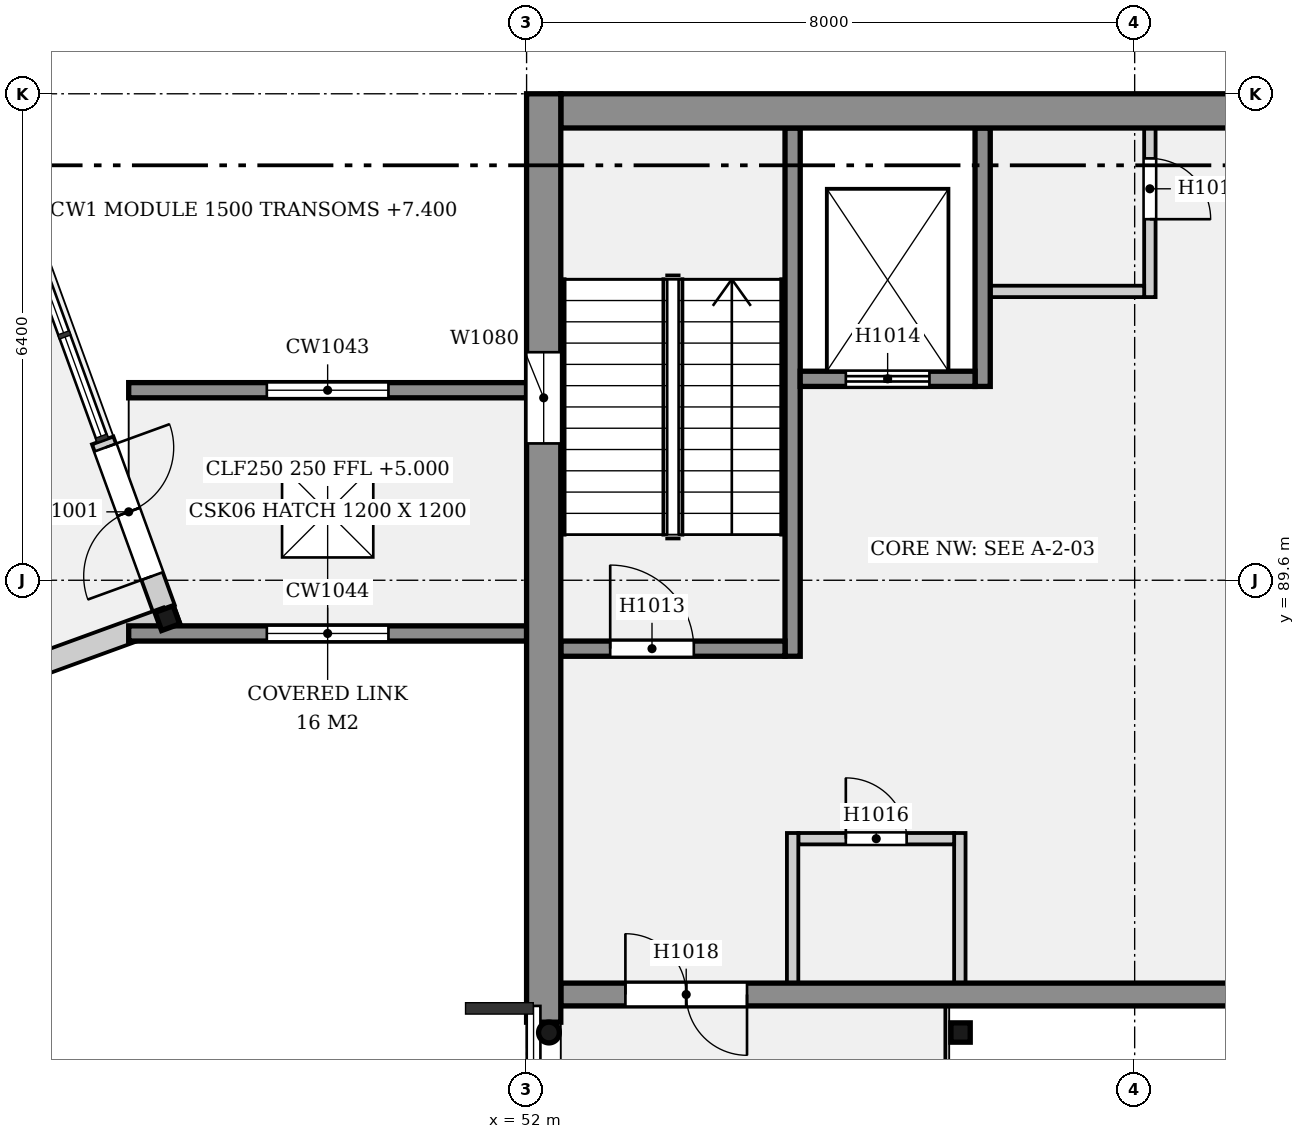
"""IFC4 building model, lengths in metres.
Left out: names, types, materials, properties, quantities, classifications, styles, units other than length and angle.
Written with IfcOpenShell. Run it as: python <this file> out.ifc"""

import sys

from ifc_helpers import new_model, si_unit, direction, frame, frame_2d, origin, origin_2d, place, context, subcontext, project, spatial, rectangle, hollow_rectangle, hollow_circle, extrude, element, fill, save


model = new_model("IFC4")
c1 = context("Model", 3, precision=1e-05, world=origin(), true_north=direction((0.0, 1.0)))
c2 = subcontext(c1, "Body", "Model", "MODEL_VIEW")
j1 = project(units=[si_unit("LENGTHUNIT", "METRE"), si_unit("PLANEANGLEUNIT", "RADIAN")], contexts=[c1])
p1 = place(None, origin())
s1 = spatial("IfcSite", under=j1, at=p1, CompositionType="ELEMENT")
p2 = place(p1, origin())
s2 = spatial("IfcBuilding", under=s1, at=p2, CompositionType="ELEMENT")
p3 = place(p2, frame((0.0, 0.0, 5.0)))
s3 = spatial("IfcBuildingStorey", under=s2, at=p3, CompositionType="ELEMENT", Elevation=5.0)
p4 = place(p3, frame((52.225, 96.0, 0.0), z_axis=(0.0, 0.0, 1.0), x_axis=(0.0, -1.0, 0.0)))
e1 = element("IfcWall", 1, at=p4, inside=s3, PredefinedType="ELEMENTEDWALL", context=c2, shape_type="SweptSolid", body=[
    extrude(rectangle(XDim=12.214, YDim=0.45, at=frame_2d((6.107, 0.0))), origin(), (0.0, 0.0, 1.0), 4.4),
])
p5 = place(p4, frame((3.4, 0.0, 0.6)))
e2 = element("IfcOpeningElement", 2, at=p5, cuts=e1, PredefinedType="OPENING", context=c2, shape_type="SweptSolid", body=[
    extrude(rectangle(XDim=1.2, YDim=3.0, at=frame_2d((0.6, 1.5))), frame((0.0, 0.235, 0.0), z_axis=(0.0, -1.0, 0.0), x_axis=(1.0, 0.0, 0.0)), (0.0, 0.0, 1.0), 0.47),
])
p6 = place(p3, frame((52.45, 95.775, 0.0), z_axis=(0.0, 0.0, 1.0), x_axis=(1.0, 0.0, 0.0)))
e3 = element("IfcWall", 3, at=p6, inside=s3, PredefinedType="ELEMENTEDWALL", context=c2, shape_type="SweptSolid", body=[
    extrude(rectangle(XDim=11.764, YDim=0.45, at=frame_2d((5.882, 0.0))), origin(), (0.0, 0.0, 1.0), 4.4),
])
p7 = place(p3, frame((52.45, 84.15, 0.0), z_axis=(0.0, 0.0, 1.0), x_axis=(1.0, 0.0, 0.0)))
e4 = element("IfcWall", 4, at=p7, inside=s3, PredefinedType="SOLIDWALL", context=c2, shape_type="SweptSolid", body=[
    extrude(rectangle(XDim=11.55, YDim=0.3, at=frame_2d((5.775, 0.0))), origin(), (0.0, 0.0, 1.0), 4.4),
])
p8 = place(p7, frame((0.85, 0.0, 0.0)))
e5 = element("IfcOpeningElement", 5, at=p8, cuts=e4, PredefinedType="OPENING", context=c2, shape_type="SweptSolid", body=[
    extrude(rectangle(XDim=1.6, YDim=2.1, at=frame_2d((0.8, 1.05))), frame((0.0, 0.16, 0.0), z_axis=(0.0, -1.0, 0.0), x_axis=(1.0, 0.0, 0.0)), (0.0, 0.0, 1.0), 0.32),
])
p9 = place(p3, frame((52.294, 83.65, 0.027), z_axis=(-0.19937683017, 0.0, 0.979922894717), x_axis=(0.0, -1.0, 0.0)))
e6 = element("IfcColumn", 6, at=p9, inside=s3, PredefinedType="COLUMN", context=c2, shape_type="SweptSolid", body=[
    extrude(hollow_circle(Radius=0.136, WallThickness=0.013, at=origin_2d()), origin(), (0.0, 0.0, 1.0), 4.462),
])
p10 = place(p3, frame((57.71, 83.65, 0.0), z_axis=(0.0, 0.0, 1.0), x_axis=(1.0, 0.0, 0.0)))
e7 = element("IfcColumn", 7, at=p10, inside=s3, PredefinedType="COLUMN", context=c2, shape_type="SweptSolid", body=[
    extrude(hollow_rectangle(XDim=0.254, YDim=0.254, WallThickness=0.016, InnerFilletRadius=0.008, OuterFilletRadius=0.024, at=origin_2d()), origin(), (0.0, 0.0, 1.0), 4.4),
])
p11 = place(p3, frame((47.274, 89.102, 0.0), z_axis=(0.0, 0.0, 1.0), x_axis=(0.939692620786, 0.342020143326, 0.0)))
e8 = element("IfcColumn", 8, at=p11, inside=s3, PredefinedType="COLUMN", context=c2, shape_type="SweptSolid", body=[
    extrude(hollow_rectangle(XDim=0.254, YDim=0.254, WallThickness=0.012, at=origin_2d()), origin(), (0.0, 0.0, 1.0), 4.4),
])
p12 = place(p3, frame((43.516, 87.733, 0.0), z_axis=(0.0, 0.0, 1.0), x_axis=(0.939686455819, 0.342037080957, 0.0)))
e9 = element("IfcWall", 9, at=p12, inside=s3, PredefinedType="ELEMENTEDWALL", context=c2, shape_type="SweptSolid", body=[
    extrude(rectangle(XDim=4.0, YDim=0.3, at=frame_2d((2.0, 0.0))), origin(), (0.0, 0.0, 1.0), 4.4),
])
p13 = place(p3, frame((47.231, 89.221, 0.0), z_axis=(0.0, 0.0, 1.0), x_axis=(-0.342008689597, 0.939696789523, 0.0)))
e10 = element("IfcWall", 10, at=p13, inside=s3, PredefinedType="ELEMENTEDWALL", context=c2, shape_type="SweptSolid", body=[
    extrude(rectangle(XDim=2.361, YDim=0.3, at=frame_2d((1.181, 0.0))), origin(), (0.0, 0.0, 1.0), 3.703),
])
p14 = place(p13, frame((0.461, 0.0, 0.0)))
e11 = element("IfcOpeningElement", 11, at=p14, cuts=e10, PredefinedType="OPENING", context=c2, shape_type="SweptSolid", body=[
    extrude(rectangle(XDim=1.8, YDim=2.1, at=frame_2d((0.9, 1.05))), frame((0.0, 0.16, 0.0), z_axis=(0.0, -1.0, 0.0), x_axis=(1.0, 0.0, 0.0)), (0.0, 0.0, 1.0), 0.32),
])
p15 = place(p3, frame((46.765, 92.1, 0.0), z_axis=(0.0, 0.0, 1.0), x_axis=(1.0, 0.0, 0.0)))
e12 = element("IfcWall", 12, at=p15, inside=s3, PredefinedType="ELEMENTEDWALL", context=c2, shape_type="SweptSolid", body=[
    extrude(rectangle(XDim=5.235, YDim=0.2, at=frame_2d((2.617, 0.0))), origin(), (0.0, 0.0, 1.0), 3.2),
])
p16 = place(p15, frame((1.817, 0.0, 0.9)))
e13 = element("IfcOpeningElement", 13, at=p16, cuts=e12, PredefinedType="OPENING", context=c2, shape_type="SweptSolid", body=[
    extrude(rectangle(XDim=1.6, YDim=1.6, at=frame_2d((0.8, 0.8))), frame((0.0, 0.11, 0.0), z_axis=(0.0, -1.0, 0.0), x_axis=(1.0, 0.0, 0.0)), (0.0, 0.0, 1.0), 0.22),
])
p17 = place(p3, frame((46.765, 88.9, 0.0), z_axis=(0.0, 0.0, 1.0), x_axis=(1.0, 0.0, 0.0)))
e14 = element("IfcWall", 14, at=p17, inside=s3, PredefinedType="ELEMENTEDWALL", context=c2, shape_type="SweptSolid", body=[
    extrude(rectangle(XDim=5.235, YDim=0.2, at=frame_2d((2.617, 0.0))), origin(), (0.0, 0.0, 1.0), 3.2),
])
p18 = place(p17, frame((1.817, 0.0, 0.9)))
e15 = element("IfcOpeningElement", 15, at=p18, cuts=e14, PredefinedType="OPENING", context=c2, shape_type="SweptSolid", body=[
    extrude(rectangle(XDim=1.6, YDim=1.6, at=frame_2d((0.8, 0.8))), frame((0.0, 0.11, 0.0), z_axis=(0.0, -1.0, 0.0), x_axis=(1.0, 0.0, 0.0)), (0.0, 0.0, 1.0), 0.22),
])
p19 = place(p3, frame((55.5, 95.55, 0.0), z_axis=(0.0, 0.0, 1.0), x_axis=(0.0, -1.0, 0.0)))
e16 = element("IfcWall", 16, at=p19, inside=s3, PredefinedType="SOLIDWALL", context=c2, shape_type="SweptSolid", body=[
    extrude(rectangle(XDim=6.95, YDim=0.2, at=frame_2d((3.475, 0.0))), origin(), (0.0, 0.0, 1.0), 4.4),
])
p20 = place(p3, frame((52.45, 88.7, 0.0), z_axis=(0.0, 0.0, 1.0), x_axis=(1.0, 0.0, 0.0)))
e17 = element("IfcWall", 17, at=p20, inside=s3, PredefinedType="SOLIDWALL", context=c2, shape_type="SweptSolid", body=[
    extrude(rectangle(XDim=2.95, YDim=0.2, at=frame_2d((1.475, 0.0))), origin(), (0.0, 0.0, 1.0), 4.4),
])
p21 = place(p20, frame((0.65, 0.0, 0.0)))
e18 = element("IfcOpeningElement", 18, at=p21, cuts=e17, PredefinedType="OPENING", context=c2, shape_type="SweptSolid", body=[
    extrude(rectangle(XDim=1.1, YDim=2.1, at=frame_2d((0.55, 1.05))), frame((0.0, 0.11, 0.0), z_axis=(0.0, -1.0, 0.0), x_axis=(1.0, 0.0, 0.0)), (0.0, 0.0, 1.0), 0.22),
])
p22 = place(p3, frame((58.0, 95.55, 0.0), z_axis=(0.0, 0.0, 1.0), x_axis=(0.0, -1.0, 0.0)))
e19 = element("IfcWall", 19, at=p22, inside=s3, PredefinedType="SOLIDWALL", context=c2, shape_type="SweptSolid", body=[
    extrude(rectangle(XDim=3.4, YDim=0.2, at=frame_2d((1.7, 0.0))), origin(), (0.0, 0.0, 1.0), 4.4),
])
p23 = place(p3, frame((55.6, 92.25, 0.0), z_axis=(0.0, 0.0, 1.0), x_axis=(1.0, 0.0, 0.0)))
e20 = element("IfcWall", 20, at=p23, inside=s3, PredefinedType="SOLIDWALL", context=c2, shape_type="SweptSolid", body=[
    extrude(rectangle(XDim=2.3, YDim=0.2, at=frame_2d((1.15, 0.0))), origin(), (0.0, 0.0, 1.0), 4.4),
])
p24 = place(p23, frame((0.6, 0.0, 0.0)))
e21 = element("IfcOpeningElement", 21, at=p24, cuts=e20, PredefinedType="OPENING", context=c2, shape_type="SweptSolid", body=[
    extrude(rectangle(XDim=1.1, YDim=2.1, at=frame_2d((0.55, 1.05))), frame((0.0, 0.11, 0.0), z_axis=(0.0, -1.0, 0.0), x_axis=(1.0, 0.0, 0.0)), (0.0, 0.0, 1.0), 0.22),
])
p25 = place(p3, frame((58.1, 93.4, 0.0), z_axis=(0.0, 0.0, 1.0), x_axis=(1.0, 0.0, 0.0)))
e22 = element("IfcWall", 22, at=p25, inside=s3, PredefinedType="PARTITIONING", context=c2, shape_type="SweptSolid", body=[
    extrude(rectangle(XDim=2.025, YDim=0.15, at=frame_2d((1.012, 0.0))), origin(), (0.0, 0.0, 1.0), 4.15),
])
p26 = place(p3, frame((60.2, 95.55, 0.0), z_axis=(0.0, 0.0, 1.0), x_axis=(0.0, -1.0, 0.0)))
e23 = element("IfcWall", 23, at=p26, inside=s3, PredefinedType="PARTITIONING", context=c2, shape_type="SweptSolid", body=[
    extrude(rectangle(XDim=2.225, YDim=0.15, at=frame_2d((1.113, 0.0))), origin(), (0.0, 0.0, 1.0), 4.15),
])
p27 = place(p26, frame((0.4, 0.0, 0.0)))
e24 = element("IfcOpeningElement", 24, at=p27, cuts=e23, PredefinedType="OPENING", context=c2, shape_type="SweptSolid", body=[
    extrude(rectangle(XDim=0.8, YDim=2.1, at=frame_2d((0.4, 1.05))), frame((0.0, 0.085, 0.0), z_axis=(0.0, -1.0, 0.0), x_axis=(1.0, 0.0, 0.0)), (0.0, 0.0, 1.0), 0.17),
])
p28 = place(p3, frame((55.575, 86.2, 0.0), z_axis=(0.0, 0.0, 1.0), x_axis=(1.0, 0.0, 0.0)))
e25 = element("IfcWall", 25, at=p28, inside=s3, PredefinedType="PARTITIONING", context=c2, shape_type="SweptSolid", body=[
    extrude(rectangle(XDim=2.05, YDim=0.15, at=frame_2d((1.025, 0.0))), origin(), (0.0, 0.0, 1.0), 4.15),
])
p29 = place(p28, frame((0.625, 0.0, 0.0)))
e26 = element("IfcOpeningElement", 26, at=p29, cuts=e25, PredefinedType="OPENING", context=c2, shape_type="SweptSolid", body=[
    extrude(rectangle(XDim=0.8, YDim=2.1, at=frame_2d((0.4, 1.05))), frame((0.0, 0.085, 0.0), z_axis=(0.0, -1.0, 0.0), x_axis=(1.0, 0.0, 0.0)), (0.0, 0.0, 1.0), 0.17),
])
for number, where, z_axis, x_axis in (
    (27, (55.5, 86.275, 0.0), (0.0, 0.0, 1.0), (0.0, -1.0, 0.0)),
    (28, (57.7, 86.275, 0.0), (0.0, 0.0, 1.0), (0.0, -1.0, 0.0)),
):
    element("IfcWall", number, at=place(p3, frame(where, z_axis=z_axis, x_axis=x_axis)), inside=s3, PredefinedType="PARTITIONING", context=c2, shape_type="SweptSolid", body=[
        extrude(rectangle(XDim=1.975, YDim=0.15, at=frame_2d((0.987, 0.0))), origin(), (0.0, 0.0, 1.0), 4.15),
    ])
p30 = place(p3, frame((0.0, 0.0, 3.2)))
p31 = place(p30, frame((49.383, 90.5, 0.0)))
p32 = place(p31, frame((0.0, 0.0, 0.15)))
e29 = element("IfcWindow", 29, at=p32, inside=s3, PartitioningType="SINGLE_PANEL", PredefinedType="SKYLIGHT", context=c2, shape_type="SweptSolid", body=[
    extrude(rectangle(XDim=1.2, YDim=1.2, at=origin_2d()), origin(), (0.0, 0.0, 1.0), 0.05),
])
p33 = place(p14, origin())
e30 = element("IfcDoor", 30, at=p33, inside=s3, OperationType="DOUBLE_DOOR_SINGLE_SWING", PredefinedType="DOOR", context=c2, shape_type="SweptSolid", body=[
    extrude(rectangle(XDim=1.8, YDim=2.1, at=frame_2d((0.9, 1.05))), frame((0.0, 0.025, 0.0), z_axis=(0.0, -1.0, 0.0), x_axis=(1.0, 0.0, 0.0)), (0.0, 0.0, 1.0), 0.05),
])
fill(e11, e30)
p34 = place(p16, origin())
e31 = element("IfcWindow", 31, at=p34, inside=s3, PartitioningType="SINGLE_PANEL", PredefinedType="WINDOW", context=c2, shape_type="SweptSolid", body=[
    extrude(rectangle(XDim=1.6, YDim=1.6, at=frame_2d((0.8, 0.8))), frame((0.0, 0.03, 0.0), z_axis=(0.0, -1.0, 0.0), x_axis=(1.0, 0.0, 0.0)), (0.0, 0.0, 1.0), 0.06),
])
fill(e13, e31)
p35 = place(p18, origin())
e32 = element("IfcWindow", 32, at=p35, inside=s3, PartitioningType="SINGLE_PANEL", PredefinedType="WINDOW", context=c2, shape_type="SweptSolid", body=[
    extrude(rectangle(XDim=1.6, YDim=1.6, at=frame_2d((0.8, 0.8))), frame((0.0, 0.03, 0.0), z_axis=(0.0, -1.0, 0.0), x_axis=(1.0, 0.0, 0.0)), (0.0, 0.0, 1.0), 0.06),
])
fill(e15, e32)
p36 = place(p21, origin())
e33 = element("IfcDoor", 33, at=p36, inside=s3, OperationType="SINGLE_SWING_LEFT", PredefinedType="DOOR", context=c2, shape_type="SweptSolid", body=[
    extrude(rectangle(XDim=1.1, YDim=2.1, at=frame_2d((0.55, 1.05))), frame((0.0, 0.025, 0.0), z_axis=(0.0, -1.0, 0.0), x_axis=(1.0, 0.0, 0.0)), (0.0, 0.0, 1.0), 0.05),
])
fill(e18, e33)
p37 = place(p24, origin())
e34 = element("IfcDoor", 34, at=p37, inside=s3, OperationType="DOUBLE_DOOR_SLIDING", PredefinedType="DOOR", context=c2, shape_type="SweptSolid", body=[
    extrude(rectangle(XDim=1.1, YDim=2.1, at=frame_2d((0.55, 1.05))), frame((0.0, 0.025, 0.0), z_axis=(0.0, -1.0, 0.0), x_axis=(1.0, 0.0, 0.0)), (0.0, 0.0, 1.0), 0.05),
])
fill(e21, e34)
p38 = place(p27, origin())
e35 = element("IfcDoor", 35, at=p38, inside=s3, OperationType="SINGLE_SWING_RIGHT", PredefinedType="DOOR", context=c2, shape_type="SweptSolid", body=[
    extrude(rectangle(XDim=0.8, YDim=2.1, at=frame_2d((0.4, 1.05))), frame((0.0, 0.025, 0.0), z_axis=(0.0, -1.0, 0.0), x_axis=(1.0, 0.0, 0.0)), (0.0, 0.0, 1.0), 0.05),
])
fill(e24, e35)
p39 = place(p29, origin())
e36 = element("IfcDoor", 36, at=p39, inside=s3, OperationType="SINGLE_SWING_LEFT", PredefinedType="DOOR", context=c2, shape_type="SweptSolid", body=[
    extrude(rectangle(XDim=0.8, YDim=2.1, at=frame_2d((0.4, 1.05))), frame((0.0, 0.025, 0.0), z_axis=(0.0, -1.0, 0.0), x_axis=(1.0, 0.0, 0.0)), (0.0, 0.0, 1.0), 0.05),
])
fill(e26, e36)
p40 = place(p8, origin())
e37 = element("IfcDoor", 37, at=p40, inside=s3, OperationType="DOUBLE_DOOR_SINGLE_SWING", PredefinedType="DOOR", context=c2, shape_type="SweptSolid", body=[
    extrude(rectangle(XDim=1.6, YDim=2.1, at=frame_2d((0.8, 1.05))), frame((0.0, 0.025, 0.0), z_axis=(0.0, -1.0, 0.0), x_axis=(1.0, 0.0, 0.0)), (0.0, 0.0, 1.0), 0.05),
])
fill(e5, e37)
p41 = place(p5, origin())
e38 = element("IfcWindow", 38, at=p41, inside=s3, PartitioningType="SINGLE_PANEL", PredefinedType="WINDOW", context=c2, shape_type="SweptSolid", body=[
    extrude(rectangle(XDim=1.2, YDim=3.0, at=frame_2d((0.6, 1.5))), frame((0.0, 0.03, 0.0), z_axis=(0.0, -1.0, 0.0), x_axis=(1.0, 0.0, 0.0)), (0.0, 0.0, 1.0), 0.06),
])
fill(e2, e38)
save(model, sys.argv[1])
